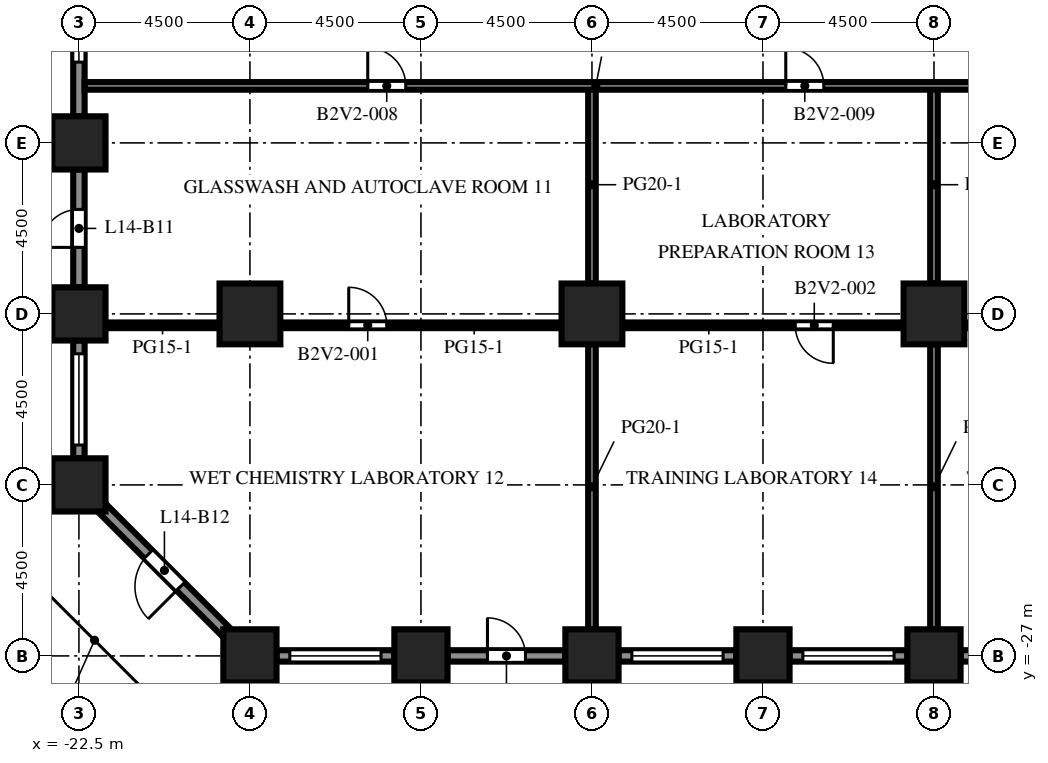
"""IFC4 building model, lengths in metres.
Left out: names, types, materials, properties, quantities, classifications, styles, units other than length and angle.
Written with IfcOpenShell. Run it as: python <this file> out.ifc"""

import sys

from ifc_helpers import new_model, si_unit, direction, frame, frame_2d, origin, origin_2d, place, context, subcontext, project, spatial, rectangle, extrude, element, fill, save


model = new_model("IFC4")
c1 = context("Model", 3, precision=1e-05, world=origin(), true_north=direction((0.0, 1.0)))
c2 = subcontext(c1, "Body", "Model", "MODEL_VIEW")
j1 = project(units=[si_unit("LENGTHUNIT", "METRE"), si_unit("PLANEANGLEUNIT", "RADIAN")], contexts=[c1])
p1 = place(None, origin())
s1 = spatial("IfcSite", under=j1, at=p1, CompositionType="ELEMENT")
p2 = place(p1, origin())
s2 = spatial("IfcBuilding", under=s1, at=p2, CompositionType="ELEMENT")
p3 = place(p2, frame((0.0, 0.0, 62.4)))
s3 = spatial("IfcBuildingStorey", under=s2, at=p3, CompositionType="ELEMENT", Elevation=62.4)
for number, where, z_axis, x_axis in (
    (1, (-22.5, -22.5, 0.0), (0.0, 0.0, 1.0), (1.0, 0.0, 0.0)),
    (2, (-22.5, -18.0, 0.0), (0.0, 0.0, 1.0), (1.0, 0.0, 0.0)),
    (3, (-22.5, -13.5, 0.0), (0.0, 0.0, 1.0), (1.0, 0.0, 0.0)),
    (4, (-18.0, -27.0, 0.0), (0.0, 0.0, 1.0), (1.0, 0.0, 0.0)),
    (5, (-13.5, -27.0, 0.0), (0.0, 0.0, 1.0), (1.0, 0.0, 0.0)),
    (6, (-9.0, -27.0, 0.0), (0.0, 0.0, 1.0), (1.0, 0.0, 0.0)),
    (7, (-4.5, -27.0, 0.0), (0.0, 0.0, 1.0), (1.0, 0.0, 0.0)),
    (8, (0.0, -27.0, 0.0), (0.0, 0.0, 1.0), (1.0, 0.0, 0.0)),
):
    element("IfcColumn", number, at=place(p3, frame(where, z_axis=z_axis, x_axis=x_axis)), inside=s3, PredefinedType="COLUMN", context=c2, shape_type="SweptSolid", body=[
        extrude(rectangle(XDim=1.4, YDim=1.4, at=origin_2d()), origin(), (0.0, 0.0, 1.0), 4.1),
    ])
for number, where, z_axis, x_axis in (
    (9, (-18.0, -18.0, 0.0), (0.0, 0.0, 1.0), (1.0, 0.0, 0.0)),
    (10, (-9.0, -18.0, 0.0), (0.0, 0.0, 1.0), (1.0, 0.0, 0.0)),
    (11, (0.0, -18.0, 0.0), (0.0, 0.0, 1.0), (1.0, 0.0, 0.0)),
):
    element("IfcColumn", number, at=place(p3, frame(where, z_axis=z_axis, x_axis=x_axis)), inside=s3, PredefinedType="COLUMN", context=c2, shape_type="SweptSolid", body=[
        extrude(rectangle(XDim=1.6, YDim=1.6, at=origin_2d()), origin(), (0.0, 0.0, 1.0), 4.1),
    ])
p4 = place(p3, frame((-14.2, -27.0, 0.0), z_axis=(0.0, 0.0, 1.0), x_axis=(-1.0, 0.0, 0.0)))
e12 = element("IfcWall", 12, at=p4, inside=s3, PredefinedType="SOLIDWALL", context=c2, shape_type="SweptSolid", body=[
    extrude(rectangle(XDim=3.1, YDim=0.3, at=frame_2d((1.55, 0.0))), origin(), (0.0, 0.0, 1.0), 2.75),
])
p5 = place(p4, frame((0.35, 0.0, 0.8)))
e13 = element("IfcOpeningElement", 13, at=p5, cuts=e12, PredefinedType="OPENING", context=c2, shape_type="SweptSolid", body=[
    extrude(rectangle(XDim=2.4, YDim=1.7, at=frame_2d((1.2, 0.85))), frame((0.0, 0.16, 0.0), z_axis=(0.0, -1.0, 0.0), x_axis=(1.0, 0.0, 0.0)), (0.0, 0.0, 1.0), 0.32),
])
p6 = place(p3, frame((-9.7, -27.0, 0.0), z_axis=(0.0, 0.0, 1.0), x_axis=(-1.0, 0.0, 0.0)))
e14 = element("IfcWall", 14, at=p6, inside=s3, PredefinedType="SOLIDWALL", context=c2, shape_type="SweptSolid", body=[
    extrude(rectangle(XDim=3.1, YDim=0.3, at=frame_2d((1.55, 0.0))), origin(), (0.0, 0.0, 1.0), 2.75),
])
p7 = place(p6, frame((1.05, 0.0, 0.0)))
e15 = element("IfcOpeningElement", 15, at=p7, cuts=e14, PredefinedType="OPENING", context=c2, shape_type="SweptSolid", body=[
    extrude(rectangle(XDim=1.0, YDim=2.2, at=frame_2d((0.5, 1.1))), frame((0.0, 0.16, 0.0), z_axis=(0.0, -1.0, 0.0), x_axis=(1.0, 0.0, 0.0)), (0.0, 0.0, 1.0), 0.32),
])
p8 = place(p3, frame((-5.2, -27.0, 0.0), z_axis=(0.0, 0.0, 1.0), x_axis=(-1.0, 0.0, 0.0)))
e16 = element("IfcWall", 16, at=p8, inside=s3, PredefinedType="SOLIDWALL", context=c2, shape_type="SweptSolid", body=[
    extrude(rectangle(XDim=3.1, YDim=0.3, at=frame_2d((1.55, 0.0))), origin(), (0.0, 0.0, 1.0), 2.75),
])
p9 = place(p8, frame((0.35, 0.0, 0.8)))
e17 = element("IfcOpeningElement", 17, at=p9, cuts=e16, PredefinedType="OPENING", context=c2, shape_type="SweptSolid", body=[
    extrude(rectangle(XDim=2.4, YDim=1.7, at=frame_2d((1.2, 0.85))), frame((0.0, 0.16, 0.0), z_axis=(0.0, -1.0, 0.0), x_axis=(1.0, 0.0, 0.0)), (0.0, 0.0, 1.0), 0.32),
])
p10 = place(p3, frame((-0.7, -27.0, 0.0), z_axis=(0.0, 0.0, 1.0), x_axis=(-1.0, 0.0, 0.0)))
e18 = element("IfcWall", 18, at=p10, inside=s3, PredefinedType="SOLIDWALL", context=c2, shape_type="SweptSolid", body=[
    extrude(rectangle(XDim=3.1, YDim=0.3, at=frame_2d((1.55, 0.0))), origin(), (0.0, 0.0, 1.0), 2.75),
])
p11 = place(p10, frame((0.35, 0.0, 0.8)))
e19 = element("IfcOpeningElement", 19, at=p11, cuts=e18, PredefinedType="OPENING", context=c2, shape_type="SweptSolid", body=[
    extrude(rectangle(XDim=2.4, YDim=1.7, at=frame_2d((1.2, 0.85))), frame((0.0, 0.16, 0.0), z_axis=(0.0, -1.0, 0.0), x_axis=(1.0, 0.0, 0.0)), (0.0, 0.0, 1.0), 0.32),
])
p12 = place(p3, frame((3.8, -27.0, 0.0), z_axis=(0.0, 0.0, 1.0), x_axis=(-1.0, 0.0, 0.0)))
e20 = element("IfcWall", 20, at=p12, inside=s3, PredefinedType="SOLIDWALL", context=c2, shape_type="SweptSolid", body=[
    extrude(rectangle(XDim=3.1, YDim=0.3, at=frame_2d((1.55, 0.0))), origin(), (0.0, 0.0, 1.0), 2.75),
])
p13 = place(p12, frame((0.35, 0.0, 0.8)))
e21 = element("IfcOpeningElement", 21, at=p13, cuts=e20, PredefinedType="OPENING", context=c2, shape_type="SweptSolid", body=[
    extrude(rectangle(XDim=2.4, YDim=1.7, at=frame_2d((1.2, 0.85))), frame((0.0, 0.16, 0.0), z_axis=(0.0, -1.0, 0.0), x_axis=(1.0, 0.0, 0.0)), (0.0, 0.0, 1.0), 0.32),
])
p14 = place(p3, frame((-22.5, -12.8, 0.0), z_axis=(0.0, 0.0, 1.0), x_axis=(0.0, 1.0, 0.0)))
e22 = element("IfcWall", 22, at=p14, inside=s3, PredefinedType="SOLIDWALL", context=c2, shape_type="SweptSolid", body=[
    extrude(rectangle(XDim=3.1, YDim=0.3, at=frame_2d((1.55, 0.0))), origin(), (0.0, 0.0, 1.0), 2.75),
])
p15 = place(p14, frame((1.425, 0.0, 0.8)))
e23 = element("IfcOpeningElement", 23, at=p15, cuts=e22, PredefinedType="OPENING", context=c2, shape_type="SweptSolid", body=[
    extrude(rectangle(XDim=1.2, YDim=1.7, at=frame_2d((0.6, 0.85))), frame((0.0, 0.16, 0.0), z_axis=(0.0, -1.0, 0.0), x_axis=(1.0, 0.0, 0.0)), (0.0, 0.0, 1.0), 0.32),
])
p16 = place(p3, frame((-22.5, -17.3, 0.0), z_axis=(0.0, 0.0, 1.0), x_axis=(0.0, 1.0, 0.0)))
e24 = element("IfcWall", 24, at=p16, inside=s3, PredefinedType="SOLIDWALL", context=c2, shape_type="SweptSolid", body=[
    extrude(rectangle(XDim=3.1, YDim=0.3, at=frame_2d((1.55, 0.0))), origin(), (0.0, 0.0, 1.0), 2.75),
])
p17 = place(p16, frame((1.05, 0.0, 0.0)))
e25 = element("IfcOpeningElement", 25, at=p17, cuts=e24, PredefinedType="OPENING", context=c2, shape_type="SweptSolid", body=[
    extrude(rectangle(XDim=1.0, YDim=2.2, at=frame_2d((0.5, 1.1))), frame((0.0, 0.16, 0.0), z_axis=(0.0, -1.0, 0.0), x_axis=(1.0, 0.0, 0.0)), (0.0, 0.0, 1.0), 0.32),
])
p18 = place(p3, frame((-22.5, -21.8, 0.0), z_axis=(0.0, 0.0, 1.0), x_axis=(0.0, 1.0, 0.0)))
e26 = element("IfcWall", 26, at=p18, inside=s3, PredefinedType="SOLIDWALL", context=c2, shape_type="SweptSolid", body=[
    extrude(rectangle(XDim=3.1, YDim=0.3, at=frame_2d((1.55, 0.0))), origin(), (0.0, 0.0, 1.0), 2.75),
])
p19 = place(p18, frame((0.35, 0.0, 0.8)))
e27 = element("IfcOpeningElement", 27, at=p19, cuts=e26, PredefinedType="OPENING", context=c2, shape_type="SweptSolid", body=[
    extrude(rectangle(XDim=2.4, YDim=1.7, at=frame_2d((1.2, 0.85))), frame((0.0, 0.16, 0.0), z_axis=(0.0, -1.0, 0.0), x_axis=(1.0, 0.0, 0.0)), (0.0, 0.0, 1.0), 0.32),
])
p20 = place(p3, frame((-18.594, -26.406, 0.0), z_axis=(0.0, 0.0, 1.0), x_axis=(-0.707106781187, 0.707106781187, 0.0)))
e28 = element("IfcWall", 28, at=p20, inside=s3, PredefinedType="SOLIDWALL", context=c2, shape_type="SweptSolid", body=[
    extrude(rectangle(XDim=4.684, YDim=0.3, at=frame_2d((2.342, 0.0))), origin(), (0.0, 0.0, 1.0), 2.75),
])
p21 = place(p20, frame((1.742, 0.0, 0.0)))
e29 = element("IfcOpeningElement", 29, at=p21, cuts=e28, PredefinedType="OPENING", context=c2, shape_type="SweptSolid", body=[
    extrude(rectangle(XDim=1.2, YDim=2.2, at=frame_2d((0.6, 1.1))), frame((0.0, 0.16, 0.0), z_axis=(0.0, -1.0, 0.0), x_axis=(1.0, 0.0, 0.0)), (0.0, 0.0, 1.0), 0.32),
])
p22 = place(p3, frame((-9.0, -26.3, 0.0), z_axis=(0.0, 0.0, 1.0), x_axis=(0.0, 1.0, 0.0)))
e30 = element("IfcWall", 30, at=p22, inside=s3, PredefinedType="PARTITIONING", context=c2, shape_type="SweptSolid", body=[
    extrude(rectangle(XDim=7.5, YDim=0.2, at=frame_2d((3.75, 0.0))), origin(), (0.0, 0.0, 1.0), 3.65),
])
p23 = place(p3, frame((-9.0, -17.2, 0.0), z_axis=(0.0, 0.0, 1.0), x_axis=(0.0, 1.0, 0.0)))
e31 = element("IfcWall", 31, at=p23, inside=s3, PredefinedType="PARTITIONING", context=c2, shape_type="SweptSolid", body=[
    extrude(rectangle(XDim=5.2, YDim=0.2, at=frame_2d((2.6, 0.0))), origin(), (0.0, 0.0, 1.0), 3.65),
])
p24 = place(p3, frame((0.0, -26.3, 0.0), z_axis=(0.0, 0.0, 1.0), x_axis=(0.0, 1.0, 0.0)))
e32 = element("IfcWall", 32, at=p24, inside=s3, PredefinedType="PARTITIONING", context=c2, shape_type="SweptSolid", body=[
    extrude(rectangle(XDim=7.5, YDim=0.2, at=frame_2d((3.75, 0.0))), origin(), (0.0, 0.0, 1.0), 3.65),
])
p25 = place(p3, frame((0.0, -17.2, 0.0), z_axis=(0.0, 0.0, 1.0), x_axis=(0.0, 1.0, 0.0)))
e33 = element("IfcWall", 33, at=p25, inside=s3, PredefinedType="PARTITIONING", context=c2, shape_type="SweptSolid", body=[
    extrude(rectangle(XDim=5.2, YDim=0.2, at=frame_2d((2.6, 0.0))), origin(), (0.0, 0.0, 1.0), 3.65),
])
p26 = place(p3, frame((-21.8, -18.3, 0.0), z_axis=(0.0, 0.0, 1.0), x_axis=(1.0, 0.0, 0.0)))
e34 = element("IfcWall", 34, at=p26, inside=s3, PredefinedType="PARTITIONING", context=c2, shape_type="SweptSolid", body=[
    extrude(rectangle(XDim=3.0, YDim=0.15, at=frame_2d((1.5, 0.0))), origin(), (0.0, 0.0, 1.0), 3.65),
])
p27 = place(p3, frame((-9.8, -18.3, 0.0), z_axis=(0.0, 0.0, 1.0), x_axis=(-1.0, 0.0, 0.0)))
e35 = element("IfcWall", 35, at=p27, inside=s3, PredefinedType="PARTITIONING", context=c2, shape_type="SweptSolid", body=[
    extrude(rectangle(XDim=7.4, YDim=0.15, at=frame_2d((3.7, 0.0))), origin(), (0.0, 0.0, 1.0), 3.65),
])
p28 = place(p27, frame((4.6, 0.0, 0.0)))
e36 = element("IfcOpeningElement", 36, at=p28, cuts=e35, PredefinedType="OPENING", context=c2, shape_type="SweptSolid", body=[
    extrude(rectangle(XDim=1.0, YDim=2.1, at=frame_2d((0.5, 1.05))), frame((0.0, 0.085, 0.0), z_axis=(0.0, -1.0, 0.0), x_axis=(1.0, 0.0, 0.0)), (0.0, 0.0, 1.0), 0.17),
])
p29 = place(p3, frame((-0.8, -18.3, 0.0), z_axis=(0.0, 0.0, 1.0), x_axis=(-1.0, 0.0, 0.0)))
e37 = element("IfcWall", 37, at=p29, inside=s3, PredefinedType="PARTITIONING", context=c2, shape_type="SweptSolid", body=[
    extrude(rectangle(XDim=7.4, YDim=0.15, at=frame_2d((3.7, 0.0))), origin(), (0.0, 0.0, 1.0), 3.65),
])
p30 = place(p29, frame((1.85, 0.0, 0.0)))
e38 = element("IfcOpeningElement", 38, at=p30, cuts=e37, PredefinedType="OPENING", context=c2, shape_type="SweptSolid", body=[
    extrude(rectangle(XDim=1.0, YDim=2.1, at=frame_2d((0.5, 1.05))), frame((0.0, 0.085, 0.0), z_axis=(0.0, -1.0, 0.0), x_axis=(1.0, 0.0, 0.0)), (0.0, 0.0, 1.0), 0.17),
])
p31 = place(p3, frame((8.2, -18.3, 0.0), z_axis=(0.0, 0.0, 1.0), x_axis=(-1.0, 0.0, 0.0)))
e39 = element("IfcWall", 39, at=p31, inside=s3, PredefinedType="PARTITIONING", context=c2, shape_type="SweptSolid", body=[
    extrude(rectangle(XDim=7.4, YDim=0.15, at=frame_2d((3.7, 0.0))), origin(), (0.0, 0.0, 1.0), 3.65),
])
p32 = place(p31, frame((2.1, 0.0, 0.0)))
e40 = element("IfcOpeningElement", 40, at=p32, cuts=e39, PredefinedType="OPENING", context=c2, shape_type="SweptSolid", body=[
    extrude(rectangle(XDim=1.0, YDim=2.1, at=frame_2d((0.5, 1.05))), frame((0.0, 0.085, 0.0), z_axis=(0.0, -1.0, 0.0), x_axis=(1.0, 0.0, 0.0)), (0.0, 0.0, 1.0), 0.17),
])
p33 = place(p3, frame((31.35, -12.0, 0.0), z_axis=(0.0, 0.0, 1.0), x_axis=(-1.0, 0.0, 0.0)))
e41 = element("IfcWall", 41, at=p33, inside=s3, PredefinedType="PARTITIONING", context=c2, shape_type="SweptSolid", body=[
    extrude(rectangle(XDim=53.7, YDim=0.2, at=frame_2d((26.85, 0.0))), origin(), (0.0, 0.0, 1.0), 3.65),
])
p34 = place(p33, frame((45.25, 0.0, 0.0)))
e42 = element("IfcOpeningElement", 42, at=p34, cuts=e41, PredefinedType="OPENING", context=c2, shape_type="SweptSolid", body=[
    extrude(rectangle(XDim=1.0, YDim=2.1, at=frame_2d((0.5, 1.05))), frame((0.0, 0.11, 0.0), z_axis=(0.0, -1.0, 0.0), x_axis=(1.0, 0.0, 0.0)), (0.0, 0.0, 1.0), 0.22),
])
p35 = place(p33, frame((34.25, 0.0, 0.0)))
e43 = element("IfcOpeningElement", 43, at=p35, cuts=e41, PredefinedType="OPENING", context=c2, shape_type="SweptSolid", body=[
    extrude(rectangle(XDim=1.0, YDim=2.1, at=frame_2d((0.5, 1.05))), frame((0.0, 0.11, 0.0), z_axis=(0.0, -1.0, 0.0), x_axis=(1.0, 0.0, 0.0)), (0.0, 0.0, 1.0), 0.22),
])
p36 = place(p33, frame((25.5, 0.0, 0.0)))
e44 = element("IfcOpeningElement", 44, at=p36, cuts=e41, PredefinedType="OPENING", context=c2, shape_type="SweptSolid", body=[
    extrude(rectangle(XDim=1.0, YDim=2.1, at=frame_2d((0.5, 1.05))), frame((0.0, 0.11, 0.0), z_axis=(0.0, -1.0, 0.0), x_axis=(1.0, 0.0, 0.0)), (0.0, 0.0, 1.0), 0.22),
])
p37 = place(p33, frame((15.0, 0.0, 0.0)))
e45 = element("IfcOpeningElement", 45, at=p37, cuts=e41, PredefinedType="OPENING", context=c2, shape_type="SweptSolid", body=[
    extrude(rectangle(XDim=1.0, YDim=2.1, at=frame_2d((0.5, 1.05))), frame((0.0, 0.11, 0.0), z_axis=(0.0, -1.0, 0.0), x_axis=(1.0, 0.0, 0.0)), (0.0, 0.0, 1.0), 0.22),
])
p38 = place(p33, frame((5.0, 0.0, 0.0)))
e46 = element("IfcOpeningElement", 46, at=p38, cuts=e41, PredefinedType="OPENING", context=c2, shape_type="SweptSolid", body=[
    extrude(rectangle(XDim=1.0, YDim=2.1, at=frame_2d((0.5, 1.05))), frame((0.0, 0.11, 0.0), z_axis=(0.0, -1.0, 0.0), x_axis=(1.0, 0.0, 0.0)), (0.0, 0.0, 1.0), 0.22),
])
p39 = place(p5, origin())
e47 = element("IfcWindow", 47, at=p39, inside=s3, PartitioningType="SINGLE_PANEL", PredefinedType="WINDOW", context=c2, shape_type="SweptSolid", body=[
    extrude(rectangle(XDim=2.4, YDim=1.7, at=frame_2d((1.2, 0.85))), frame((0.0, 0.03, 0.0), z_axis=(0.0, -1.0, 0.0), x_axis=(1.0, 0.0, 0.0)), (0.0, 0.0, 1.0), 0.06),
])
fill(e13, e47)
p40 = place(p7, origin())
e48 = element("IfcDoor", 48, at=p40, inside=s3, OperationType="SINGLE_SWING_RIGHT", PredefinedType="DOOR", context=c2, shape_type="SweptSolid", body=[
    extrude(rectangle(XDim=1.0, YDim=2.2, at=frame_2d((0.5, 1.1))), frame((0.0, 0.025, 0.0), z_axis=(0.0, -1.0, 0.0), x_axis=(1.0, 0.0, 0.0)), (0.0, 0.0, 1.0), 0.05),
])
fill(e15, e48)
p41 = place(p9, origin())
e49 = element("IfcWindow", 49, at=p41, inside=s3, PartitioningType="SINGLE_PANEL", PredefinedType="WINDOW", context=c2, shape_type="SweptSolid", body=[
    extrude(rectangle(XDim=2.4, YDim=1.7, at=frame_2d((1.2, 0.85))), frame((0.0, 0.03, 0.0), z_axis=(0.0, -1.0, 0.0), x_axis=(1.0, 0.0, 0.0)), (0.0, 0.0, 1.0), 0.06),
])
fill(e17, e49)
p42 = place(p11, origin())
e50 = element("IfcWindow", 50, at=p42, inside=s3, PartitioningType="SINGLE_PANEL", PredefinedType="WINDOW", context=c2, shape_type="SweptSolid", body=[
    extrude(rectangle(XDim=2.4, YDim=1.7, at=frame_2d((1.2, 0.85))), frame((0.0, 0.03, 0.0), z_axis=(0.0, -1.0, 0.0), x_axis=(1.0, 0.0, 0.0)), (0.0, 0.0, 1.0), 0.06),
])
fill(e19, e50)
p43 = place(p15, origin())
e51 = element("IfcWindow", 51, at=p43, inside=s3, PartitioningType="SINGLE_PANEL", PredefinedType="WINDOW", context=c2, shape_type="SweptSolid", body=[
    extrude(rectangle(XDim=1.2, YDim=1.7, at=frame_2d((0.6, 0.85))), frame((0.0, 0.03, 0.0), z_axis=(0.0, -1.0, 0.0), x_axis=(1.0, 0.0, 0.0)), (0.0, 0.0, 1.0), 0.06),
])
fill(e23, e51)
p44 = place(p17, origin())
e52 = element("IfcDoor", 52, at=p44, inside=s3, OperationType="SINGLE_SWING_LEFT", PredefinedType="DOOR", context=c2, shape_type="SweptSolid", body=[
    extrude(rectangle(XDim=1.0, YDim=2.2, at=frame_2d((0.5, 1.1))), frame((0.0, 0.025, 0.0), z_axis=(0.0, -1.0, 0.0), x_axis=(1.0, 0.0, 0.0)), (0.0, 0.0, 1.0), 0.05),
])
fill(e25, e52)
p45 = place(p19, origin())
e53 = element("IfcWindow", 53, at=p45, inside=s3, PartitioningType="SINGLE_PANEL", PredefinedType="WINDOW", context=c2, shape_type="SweptSolid", body=[
    extrude(rectangle(XDim=2.4, YDim=1.7, at=frame_2d((1.2, 0.85))), frame((0.0, 0.03, 0.0), z_axis=(0.0, -1.0, 0.0), x_axis=(1.0, 0.0, 0.0)), (0.0, 0.0, 1.0), 0.06),
])
fill(e27, e53)
p46 = place(p21, origin())
e54 = element("IfcDoor", 54, at=p46, inside=s3, OperationType="SINGLE_SWING_LEFT", PredefinedType="DOOR", context=c2, shape_type="SweptSolid", body=[
    extrude(rectangle(XDim=1.2, YDim=2.2, at=frame_2d((0.6, 1.1))), frame((0.0, 0.025, 0.0), z_axis=(0.0, -1.0, 0.0), x_axis=(1.0, 0.0, 0.0)), (0.0, 0.0, 1.0), 0.05),
])
fill(e29, e54)
p47 = place(p28, origin())
e55 = element("IfcDoor", 55, at=p47, inside=s3, OperationType="SINGLE_SWING_RIGHT", PredefinedType="DOOR", context=c2, shape_type="SweptSolid", body=[
    extrude(rectangle(XDim=1.0, YDim=2.1, at=frame_2d((0.5, 1.05))), frame((0.0, 0.025, 0.0), z_axis=(0.0, -1.0, 0.0), x_axis=(1.0, 0.0, 0.0)), (0.0, 0.0, 1.0), 0.05),
])
fill(e36, e55)
p48 = place(p30, origin())
e56 = element("IfcDoor", 56, at=p48, inside=s3, OperationType="SINGLE_SWING_LEFT", PredefinedType="DOOR", context=c2, shape_type="SweptSolid", body=[
    extrude(rectangle(XDim=1.0, YDim=2.1, at=frame_2d((0.5, 1.05))), frame((0.0, 0.025, 0.0), z_axis=(0.0, -1.0, 0.0), x_axis=(1.0, 0.0, 0.0)), (0.0, 0.0, 1.0), 0.05),
])
fill(e38, e56)
p49 = place(p34, origin())
e57 = element("IfcDoor", 57, at=p49, inside=s3, OperationType="SINGLE_SWING_RIGHT", PredefinedType="DOOR", context=c2, shape_type="SweptSolid", body=[
    extrude(rectangle(XDim=1.0, YDim=2.1, at=frame_2d((0.5, 1.05))), frame((0.0, 0.025, 0.0), z_axis=(0.0, -1.0, 0.0), x_axis=(1.0, 0.0, 0.0)), (0.0, 0.0, 1.0), 0.05),
])
fill(e42, e57)
p50 = place(p35, origin())
e58 = element("IfcDoor", 58, at=p50, inside=s3, OperationType="SINGLE_SWING_RIGHT", PredefinedType="DOOR", context=c2, shape_type="SweptSolid", body=[
    extrude(rectangle(XDim=1.0, YDim=2.1, at=frame_2d((0.5, 1.05))), frame((0.0, 0.025, 0.0), z_axis=(0.0, -1.0, 0.0), x_axis=(1.0, 0.0, 0.0)), (0.0, 0.0, 1.0), 0.05),
])
fill(e43, e58)
save(model, sys.argv[1])
